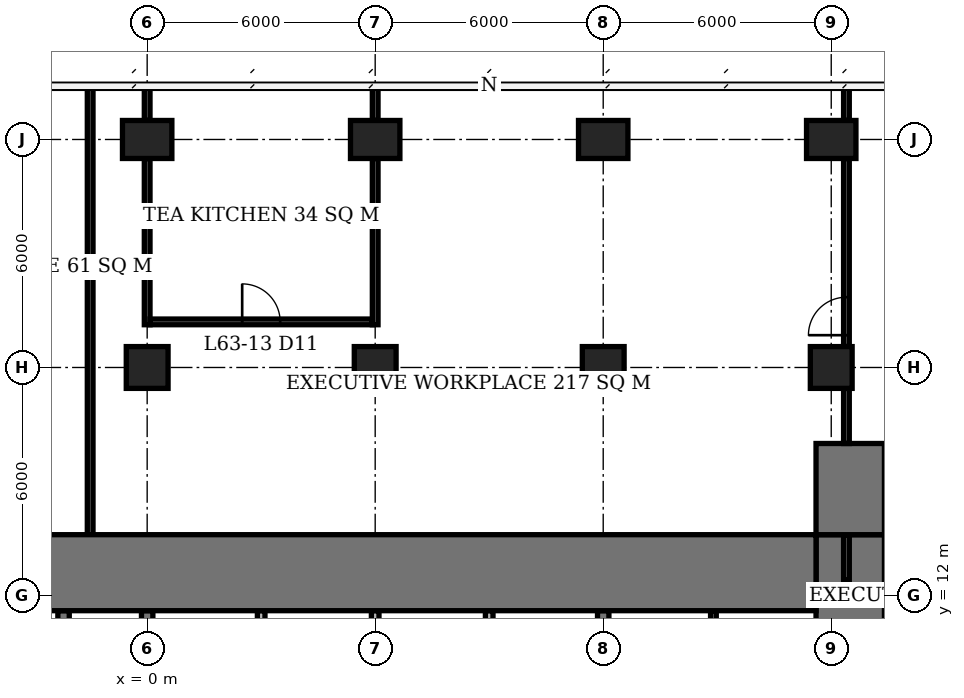
"""IFC4 building model, lengths in metres.
Left out: names, types, materials, properties, quantities, classifications, styles, units other than length and angle.
Written with IfcOpenShell. Run it as: python <this file> out.ifc"""

import sys

from ifc_helpers import new_model, si_unit, direction, frame, frame_2d, origin, origin_2d, place, context, subcontext, project, spatial, rectangle, extrude, element, fill, save


model = new_model("IFC4")
c1 = context("Model", 3, precision=1e-05, world=origin(), true_north=direction((0.0, 1.0)))
c2 = subcontext(c1, "Body", "Model", "MODEL_VIEW")
j1 = project(units=[si_unit("LENGTHUNIT", "METRE"), si_unit("PLANEANGLEUNIT", "RADIAN")], contexts=[c1])
p1 = place(None, origin())
s1 = spatial("IfcSite", under=j1, at=p1, CompositionType="ELEMENT")
p2 = place(p1, origin())
s2 = spatial("IfcBuilding", under=s1, at=p2, CompositionType="ELEMENT")
p3 = place(p2, frame((0.0, 0.0, 256.7)))
s3 = spatial("IfcBuildingStorey", under=s2, at=p3, CompositionType="ELEMENT", Elevation=256.7)
p4 = place(p3, frame((0.0, 18.0, 0.0), z_axis=(0.0, 0.0, 1.0), x_axis=(1.0, 0.0, 0.0)))
e1 = element("IfcColumn", 1, at=p4, inside=s3, PredefinedType="COLUMN", context=c2, shape_type="SweptSolid", body=[
    extrude(rectangle(XDim=1.1, YDim=1.1, at=origin_2d()), origin(), (0.0, 0.0, 1.0), 3.9),
])
p5 = place(p3, frame((0.0, 24.0, 0.0), z_axis=(0.0, 0.0, 1.0), x_axis=(1.0, 0.0, 0.0)))
e2 = element("IfcColumn", 2, at=p5, inside=s3, PredefinedType="COLUMN", context=c2, shape_type="SweptSolid", body=[
    extrude(rectangle(XDim=1.3, YDim=1.0, at=origin_2d()), origin(), (0.0, 0.0, 1.0), 3.9),
])
p6 = place(p3, frame((6.0, 18.0, 0.0), z_axis=(0.0, 0.0, 1.0), x_axis=(1.0, 0.0, 0.0)))
e3 = element("IfcColumn", 3, at=p6, inside=s3, PredefinedType="COLUMN", context=c2, shape_type="SweptSolid", body=[
    extrude(rectangle(XDim=1.1, YDim=1.1, at=origin_2d()), origin(), (0.0, 0.0, 1.0), 3.9),
])
p7 = place(p3, frame((6.0, 24.0, 0.0), z_axis=(0.0, 0.0, 1.0), x_axis=(1.0, 0.0, 0.0)))
e4 = element("IfcColumn", 4, at=p7, inside=s3, PredefinedType="COLUMN", context=c2, shape_type="SweptSolid", body=[
    extrude(rectangle(XDim=1.3, YDim=1.0, at=origin_2d()), origin(), (0.0, 0.0, 1.0), 3.9),
])
p8 = place(p3, frame((12.0, 18.0, 0.0), z_axis=(0.0, 0.0, 1.0), x_axis=(1.0, 0.0, 0.0)))
e5 = element("IfcColumn", 5, at=p8, inside=s3, PredefinedType="COLUMN", context=c2, shape_type="SweptSolid", body=[
    extrude(rectangle(XDim=1.1, YDim=1.1, at=origin_2d()), origin(), (0.0, 0.0, 1.0), 3.9),
])
p9 = place(p3, frame((12.0, 24.0, 0.0), z_axis=(0.0, 0.0, 1.0), x_axis=(1.0, 0.0, 0.0)))
e6 = element("IfcColumn", 6, at=p9, inside=s3, PredefinedType="COLUMN", context=c2, shape_type="SweptSolid", body=[
    extrude(rectangle(XDim=1.3, YDim=1.0, at=origin_2d()), origin(), (0.0, 0.0, 1.0), 3.9),
])
p10 = place(p3, frame((18.0, 18.0, 0.0), z_axis=(0.0, 0.0, 1.0), x_axis=(1.0, 0.0, 0.0)))
e7 = element("IfcColumn", 7, at=p10, inside=s3, PredefinedType="COLUMN", context=c2, shape_type="SweptSolid", body=[
    extrude(rectangle(XDim=1.1, YDim=1.1, at=origin_2d()), origin(), (0.0, 0.0, 1.0), 3.9),
])
p11 = place(p3, frame((18.0, 24.0, 0.0), z_axis=(0.0, 0.0, 1.0), x_axis=(1.0, 0.0, 0.0)))
e8 = element("IfcColumn", 8, at=p11, inside=s3, PredefinedType="COLUMN", context=c2, shape_type="SweptSolid", body=[
    extrude(rectangle(XDim=1.3, YDim=1.0, at=origin_2d()), origin(), (0.0, 0.0, 1.0), 3.9),
])
p12 = place(p3, frame((-5.6, 12.6, 0.0), z_axis=(0.0, 0.0, 1.0), x_axis=(1.0, 0.0, 0.0)))
e9 = element("IfcWall", 9, at=p12, inside=s3, PredefinedType="SHEAR", context=c2, shape_type="SweptSolid", body=[
    extrude(rectangle(XDim=23.2, YDim=2.0, at=frame_2d((11.6, 0.0))), origin(), (0.0, 0.0, 1.0), 3.9),
])
p13 = place(p3, frame((18.5, -7.6, 0.0), z_axis=(0.0, 0.0, 1.0), x_axis=(0.0, 1.0, 0.0)))
e10 = element("IfcWall", 10, at=p13, inside=s3, PredefinedType="SHEAR", context=c2, shape_type="SweptSolid", body=[
    extrude(rectangle(XDim=21.2, YDim=1.8, at=frame_2d((10.6, 0.0))), origin(), (0.0, 0.0, 1.0), 3.9),
])
p14 = place(p13, frame((9.2, 0.0, 0.0)))
e11 = element("IfcOpeningElement", 11, at=p14, cuts=e10, PredefinedType="OPENING", context=c2, shape_type="SweptSolid", body=[
    extrude(rectangle(XDim=1.8, YDim=2.4, at=frame_2d((0.9, 1.2))), frame((0.0, 0.91, 0.0), z_axis=(0.0, -1.0, 0.0), x_axis=(1.0, 0.0, 0.0)), (0.0, 0.0, 1.0), 1.82),
])
p15 = place(p3, frame((18.5, 13.6, 0.0), z_axis=(0.0, 0.0, 1.0), x_axis=(0.0, 1.0, 0.0)))
e12 = element("IfcWall", 12, at=p15, inside=s3, PredefinedType="SHEAR", context=c2, shape_type="SweptSolid", body=[
    extrude(rectangle(XDim=2.4, YDim=1.8, at=frame_2d((1.2, 0.0))), origin(), (0.0, 0.0, 1.0), 3.9),
])
p16 = place(p3, frame((0.0, 3.15, 0.0), z_axis=(0.0, 0.0, 1.0), x_axis=(0.0, 1.0, 0.0)))
e13 = element("IfcWall", 13, at=p16, inside=s3, PredefinedType="SHEAR", context=c2, shape_type="SweptSolid", body=[
    extrude(rectangle(XDim=8.45, YDim=0.3, at=frame_2d((4.225, 0.0))), origin(), (0.0, 0.0, 1.0), 3.9),
])
p17 = place(p3, frame((12.0, 6.15, 0.0), z_axis=(0.0, 0.0, 1.0), x_axis=(0.0, 1.0, 0.0)))
e14 = element("IfcWall", 14, at=p17, inside=s3, PredefinedType="SHEAR", context=c2, shape_type="SweptSolid", body=[
    extrude(rectangle(XDim=5.45, YDim=0.3, at=frame_2d((2.725, 0.0))), origin(), (0.0, 0.0, 1.0), 3.9),
])
p18 = place(p3, frame((-2.2, 3.15, 0.0), z_axis=(0.0, 0.0, 1.0), x_axis=(0.0, 1.0, 0.0)))
e15 = element("IfcWall", 15, at=p18, inside=s3, PredefinedType="SHEAR", context=c2, shape_type="SweptSolid", body=[
    extrude(rectangle(XDim=8.45, YDim=0.3, at=frame_2d((4.225, 0.0))), origin(), (0.0, 0.0, 1.0), 3.9),
])
for number, where, z_axis, x_axis in (
    (16, (3.0, 6.15, 0.0), (0.0, 0.0, 1.0), (0.0, 1.0, 0.0)),
    (17, (6.0, 6.15, 0.0), (0.0, 0.0, 1.0), (0.0, 1.0, 0.0)),
    (18, (9.0, 6.15, 0.0), (0.0, 0.0, 1.0), (0.0, 1.0, 0.0)),
):
    element("IfcWall", number, at=place(p3, frame(where, z_axis=z_axis, x_axis=x_axis)), inside=s3, PredefinedType="SOLIDWALL", context=c2, shape_type="SweptSolid", body=[
        extrude(rectangle(XDim=5.45, YDim=0.2, at=frame_2d((2.725, 0.0))), origin(), (0.0, 0.0, 1.0), 3.9),
    ])
p19 = place(p3, frame((14.9, 6.15, 0.0), z_axis=(0.0, 0.0, 1.0), x_axis=(0.0, 1.0, 0.0)))
e19 = element("IfcWall", 19, at=p19, inside=s3, PredefinedType="PLUMBINGWALL", context=c2, shape_type="SweptSolid", body=[
    extrude(rectangle(XDim=5.45, YDim=0.15, at=frame_2d((2.725, 0.0))), origin(), (0.0, 0.0, 1.0), 3.65),
])
p20 = place(p3, frame((0.075, 19.2, 0.0), z_axis=(0.0, 0.0, 1.0), x_axis=(1.0, 0.0, 0.0)))
e20 = element("IfcWall", 20, at=p20, inside=s3, PredefinedType="PARTITIONING", context=c2, shape_type="SweptSolid", body=[
    extrude(rectangle(XDim=5.85, YDim=0.15, at=frame_2d((2.925, 0.0))), origin(), (0.0, 0.0, 1.0), 3.65),
])
p21 = place(p20, frame((2.425, 0.0, 0.0)))
e21 = element("IfcOpeningElement", 21, at=p21, cuts=e20, PredefinedType="OPENING", context=c2, shape_type="SweptSolid", body=[
    extrude(rectangle(XDim=1.0, YDim=2.4, at=frame_2d((0.5, 1.2))), frame((0.0, 0.085, 0.0), z_axis=(0.0, -1.0, 0.0), x_axis=(1.0, 0.0, 0.0)), (0.0, 0.0, 1.0), 0.17),
])
p22 = place(p3, frame((0.0, 19.125, 0.0), z_axis=(0.0, 0.0, 1.0), x_axis=(0.0, 1.0, 0.0)))
e22 = element("IfcWall", 22, at=p22, inside=s3, PredefinedType="PARTITIONING", context=c2, shape_type="SweptSolid", body=[
    extrude(rectangle(XDim=4.375, YDim=0.15, at=frame_2d((2.188, 0.0))), origin(), (0.0, 0.0, 1.0), 3.65),
])
p23 = place(p3, frame((0.0, 24.5, 0.0), z_axis=(0.0, 0.0, 1.0), x_axis=(0.0, 1.0, 0.0)))
e23 = element("IfcWall", 23, at=p23, inside=s3, PredefinedType="PARTITIONING", context=c2, shape_type="SweptSolid", body=[
    extrude(rectangle(XDim=0.875, YDim=0.15, at=frame_2d((0.438, 0.0))), origin(), (0.0, 0.0, 1.0), 3.65),
])
p24 = place(p3, frame((6.0, 19.125, 0.0), z_axis=(0.0, 0.0, 1.0), x_axis=(0.0, 1.0, 0.0)))
e24 = element("IfcWall", 24, at=p24, inside=s3, PredefinedType="PARTITIONING", context=c2, shape_type="SweptSolid", body=[
    extrude(rectangle(XDim=4.375, YDim=0.15, at=frame_2d((2.188, 0.0))), origin(), (0.0, 0.0, 1.0), 3.65),
])
p25 = place(p3, frame((6.0, 24.5, 0.0), z_axis=(0.0, 0.0, 1.0), x_axis=(0.0, 1.0, 0.0)))
e25 = element("IfcWall", 25, at=p25, inside=s3, PredefinedType="PARTITIONING", context=c2, shape_type="SweptSolid", body=[
    extrude(rectangle(XDim=0.85, YDim=0.15, at=frame_2d((0.425, 0.0))), origin(), (0.0, 0.0, 1.0), 3.65),
])
p26 = place(p3, frame((-1.5, 12.4, 0.0), z_axis=(0.0, 0.0, 1.0), x_axis=(0.0, 1.0, 0.0)))
e26 = element("IfcWall", 26, at=p26, inside=s3, PredefinedType="PARTITIONING", context=c2, shape_type="SweptSolid", body=[
    extrude(rectangle(XDim=12.975, YDim=0.15, at=frame_2d((6.488, 0.0))), origin(), (0.0, 0.0, 1.0), 3.65),
])
p27 = place(p3, frame((18.4, 12.4, 0.0), z_axis=(0.0, 0.0, 1.0), x_axis=(0.0, 1.0, 0.0)))
e27 = element("IfcWall", 27, at=p27, inside=s3, PredefinedType="PARTITIONING", context=c2, shape_type="SweptSolid", body=[
    extrude(rectangle(XDim=1.2, YDim=0.15, at=frame_2d((0.6, 0.0))), origin(), (0.0, 0.0, 1.0), 3.65),
])
p28 = place(p3, frame((18.4, 16.0, 0.0), z_axis=(0.0, 0.0, 1.0), x_axis=(0.0, 1.0, 0.0)))
e28 = element("IfcWall", 28, at=p28, inside=s3, PredefinedType="PARTITIONING", context=c2, shape_type="SweptSolid", body=[
    extrude(rectangle(XDim=1.45, YDim=0.15, at=frame_2d((0.725, 0.0))), origin(), (0.0, 0.0, 1.0), 3.65),
])
p29 = place(p3, frame((18.4, 18.55, 0.0), z_axis=(0.0, 0.0, 1.0), x_axis=(0.0, 1.0, 0.0)))
e29 = element("IfcWall", 29, at=p29, inside=s3, PredefinedType="PARTITIONING", context=c2, shape_type="SweptSolid", body=[
    extrude(rectangle(XDim=4.95, YDim=0.15, at=frame_2d((2.475, 0.0))), origin(), (0.0, 0.0, 1.0), 3.65),
])
p30 = place(p29, frame((0.3, 0.0, 0.0)))
e30 = element("IfcOpeningElement", 30, at=p30, cuts=e29, PredefinedType="OPENING", context=c2, shape_type="SweptSolid", body=[
    extrude(rectangle(XDim=1.0, YDim=2.4, at=frame_2d((0.5, 1.2))), frame((0.0, 0.085, 0.0), z_axis=(0.0, -1.0, 0.0), x_axis=(1.0, 0.0, 0.0)), (0.0, 0.0, 1.0), 0.17),
])
p31 = place(p3, frame((18.4, 24.5, 0.0), z_axis=(0.0, 0.0, 1.0), x_axis=(0.0, 1.0, 0.0)))
e31 = element("IfcWall", 31, at=p31, inside=s3, PredefinedType="PARTITIONING", context=c2, shape_type="SweptSolid", body=[
    extrude(rectangle(XDim=0.85, YDim=0.15, at=frame_2d((0.425, 0.0))), origin(), (0.0, 0.0, 1.0), 3.65),
])
p32 = place(p21, origin())
e32 = element("IfcDoor", 32, at=p32, inside=s3, OperationType="SINGLE_SWING_LEFT", PredefinedType="DOOR", context=c2, shape_type="SweptSolid", body=[
    extrude(rectangle(XDim=1.0, YDim=2.4, at=frame_2d((0.5, 1.2))), frame((0.0, 0.025, 0.0), z_axis=(0.0, -1.0, 0.0), x_axis=(1.0, 0.0, 0.0)), (0.0, 0.0, 1.0), 0.05),
])
fill(e21, e32)
p33 = place(p30, origin())
e33 = element("IfcDoor", 33, at=p33, inside=s3, OperationType="SINGLE_SWING_LEFT", PredefinedType="DOOR", context=c2, shape_type="SweptSolid", body=[
    extrude(rectangle(XDim=1.0, YDim=2.4, at=frame_2d((0.5, 1.2))), frame((0.0, 0.025, 0.0), z_axis=(0.0, -1.0, 0.0), x_axis=(1.0, 0.0, 0.0)), (0.0, 0.0, 1.0), 0.05),
])
fill(e30, e33)
save(model, sys.argv[1])
